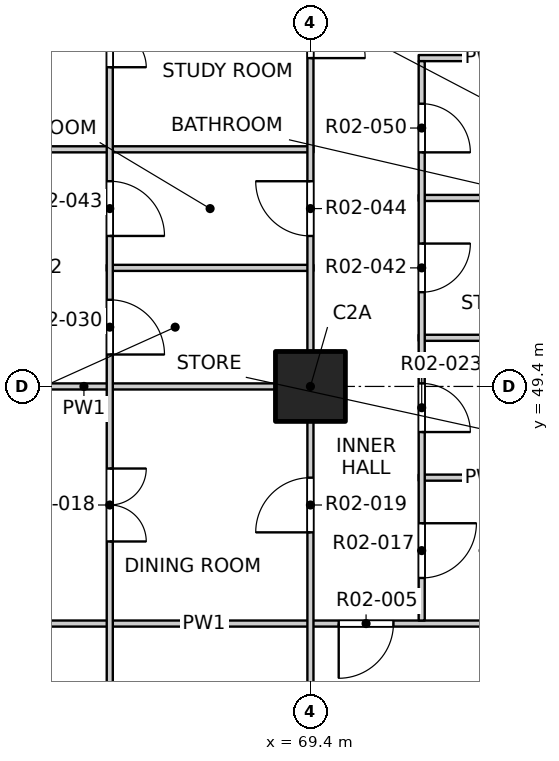
"""IFC4 building model, lengths in metres.
Left out: names, types, materials, properties, quantities, classifications, styles, units other than length and angle.
Written with IfcOpenShell. Run it as: python <this file> out.ifc"""

import sys

from ifc_helpers import new_model, si_unit, direction, frame, frame_2d, origin, origin_2d, place, context, subcontext, project, spatial, rectangle, extrude, element, fill, save


model = new_model("IFC4")
c1 = context("Model", 3, precision=1e-05, world=origin(), true_north=direction((0.0, 1.0)))
c2 = subcontext(c1, "Body", "Model", "MODEL_VIEW")
j1 = project(units=[si_unit("LENGTHUNIT", "METRE"), si_unit("PLANEANGLEUNIT", "RADIAN")], contexts=[c1])
p1 = place(None, origin())
s1 = spatial("IfcSite", under=j1, at=p1, CompositionType="ELEMENT")
p2 = place(p1, origin())
s2 = spatial("IfcBuilding", under=s1, at=p2, CompositionType="ELEMENT")
p3 = place(p2, frame((0.0, 0.0, 36.5)))
s3 = spatial("IfcBuildingStorey", under=s2, at=p3, CompositionType="ELEMENT", Elevation=36.5)
p4 = place(p3, frame((69.4, 49.4, -0.25), z_axis=(0.0, 0.0, 1.0), x_axis=(1.0, 0.0, 0.0)))
e1 = element("IfcColumn", 1, at=p4, inside=s3, PredefinedType="COLUMN", context=c2, shape_type="SweptSolid", body=[
    extrude(rectangle(XDim=1.15, YDim=1.15, at=origin_2d()), origin(), (0.0, 0.0, 1.0), 3.4),
])
p5 = place(p3, frame((61.9, 45.5, 0.0), z_axis=(0.0, 0.0, 1.0), x_axis=(1.0, 0.0, 0.0)))
e2 = element("IfcWall", 2, at=p5, inside=s3, PredefinedType="PARTITIONING", context=c2, shape_type="SweptSolid", body=[
    extrude(rectangle(XDim=11.5, YDim=0.1, at=frame_2d((5.75, 0.0))), origin(), (0.0, 0.0, 1.0), 3.15),
])
p6 = place(p5, frame((7.965, 0.0, 0.0)))
e3 = element("IfcOpeningElement", 3, at=p6, cuts=e2, PredefinedType="OPENING", context=c2, shape_type="SweptSolid", body=[
    extrude(rectangle(XDim=0.9, YDim=2.1, at=frame_2d((0.45, 1.05))), frame((0.0, 0.06, 0.0), z_axis=(0.0, -1.0, 0.0), x_axis=(1.0, 0.0, 0.0)), (0.0, 0.0, 1.0), 0.12),
])
p7 = place(p3, frame((71.18, 47.9, 0.0), z_axis=(0.0, 0.0, 1.0), x_axis=(1.0, 0.0, 0.0)))
e4 = element("IfcWall", 4, at=p7, inside=s3, PredefinedType="PARTITIONING", context=c2, shape_type="SweptSolid", body=[
    extrude(rectangle(XDim=2.22, YDim=0.1, at=frame_2d((1.11, 0.0))), origin(), (0.0, 0.0, 1.0), 3.15),
])
p8 = place(p3, frame((61.9, 49.4, 0.0), z_axis=(0.0, 0.0, 1.0), x_axis=(1.0, 0.0, 0.0)))
e5 = element("IfcWall", 5, at=p8, inside=s3, PredefinedType="PARTITIONING", context=c2, shape_type="SweptSolid", body=[
    extrude(rectangle(XDim=7.55, YDim=0.1, at=frame_2d((3.775, 0.0))), origin(), (0.0, 0.0, 1.0), 3.15),
])
p9 = place(p3, frame((71.18, 50.2, 0.0), z_axis=(0.0, 0.0, 1.0), x_axis=(1.0, 0.0, 0.0)))
e6 = element("IfcWall", 6, at=p9, inside=s3, PredefinedType="PARTITIONING", context=c2, shape_type="SweptSolid", body=[
    extrude(rectangle(XDim=2.22, YDim=0.1, at=frame_2d((1.11, 0.0))), origin(), (0.0, 0.0, 1.0), 3.15),
])
p10 = place(p3, frame((66.05, 51.35, 0.0), z_axis=(0.0, 0.0, 1.0), x_axis=(1.0, 0.0, 0.0)))
e7 = element("IfcWall", 7, at=p10, inside=s3, PredefinedType="PARTITIONING", context=c2, shape_type="SweptSolid", body=[
    extrude(rectangle(XDim=3.4, YDim=0.1, at=frame_2d((1.7, 0.0))), origin(), (0.0, 0.0, 1.0), 3.15),
])
p11 = place(p3, frame((71.18, 52.5, 0.0), z_axis=(0.0, 0.0, 1.0), x_axis=(1.0, 0.0, 0.0)))
e8 = element("IfcWall", 8, at=p11, inside=s3, PredefinedType="PARTITIONING", context=c2, shape_type="SweptSolid", body=[
    extrude(rectangle(XDim=2.22, YDim=0.1, at=frame_2d((1.11, 0.0))), origin(), (0.0, 0.0, 1.0), 3.15),
])
p12 = place(p3, frame((61.9, 53.3, 0.0), z_axis=(0.0, 0.0, 1.0), x_axis=(1.0, 0.0, 0.0)))
e9 = element("IfcWall", 9, at=p12, inside=s3, PredefinedType="PARTITIONING", context=c2, shape_type="SweptSolid", body=[
    extrude(rectangle(XDim=7.55, YDim=0.1, at=frame_2d((3.775, 0.0))), origin(), (0.0, 0.0, 1.0), 3.15),
])
p13 = place(p3, frame((71.18, 54.8, 0.0), z_axis=(0.0, 0.0, 1.0), x_axis=(1.0, 0.0, 0.0)))
e10 = element("IfcWall", 10, at=p13, inside=s3, PredefinedType="PARTITIONING", context=c2, shape_type="SweptSolid", body=[
    extrude(rectangle(XDim=2.22, YDim=0.1, at=frame_2d((1.11, 0.0))), origin(), (0.0, 0.0, 1.0), 3.15),
])
p14 = place(p3, frame((66.1, 41.9, 0.0), z_axis=(0.0, 0.0, 1.0), x_axis=(0.0, 1.0, 0.0)))
e11 = element("IfcWall", 11, at=p14, inside=s3, PredefinedType="PARTITIONING", context=c2, shape_type="SweptSolid", body=[
    extrude(rectangle(XDim=34.7, YDim=0.1, at=frame_2d((17.35, 0.0))), origin(), (0.0, 0.0, 1.0), 3.15),
])
p15 = place(p14, frame((1.05, 0.0, 0.0)))
e12 = element("IfcOpeningElement", 12, at=p15, cuts=e11, PredefinedType="OPENING", context=c2, shape_type="SweptSolid", body=[
    extrude(rectangle(XDim=1.2, YDim=2.1, at=frame_2d((0.6, 1.05))), frame((0.0, 0.06, 0.0), z_axis=(0.0, -1.0, 0.0), x_axis=(1.0, 0.0, 0.0)), (0.0, 0.0, 1.0), 0.12),
])
p16 = place(p14, frame((4.95, 0.0, 0.0)))
e13 = element("IfcOpeningElement", 13, at=p16, cuts=e11, PredefinedType="OPENING", context=c2, shape_type="SweptSolid", body=[
    extrude(rectangle(XDim=1.2, YDim=2.1, at=frame_2d((0.6, 1.05))), frame((0.0, 0.06, 0.0), z_axis=(0.0, -1.0, 0.0), x_axis=(1.0, 0.0, 0.0)), (0.0, 0.0, 1.0), 0.12),
])
p17 = place(p14, frame((8.025, 0.0, 0.0)))
e14 = element("IfcOpeningElement", 14, at=p17, cuts=e11, PredefinedType="OPENING", context=c2, shape_type="SweptSolid", body=[
    extrude(rectangle(XDim=0.9, YDim=2.1, at=frame_2d((0.45, 1.05))), frame((0.0, 0.06, 0.0), z_axis=(0.0, -1.0, 0.0), x_axis=(1.0, 0.0, 0.0)), (0.0, 0.0, 1.0), 0.12),
])
p18 = place(p14, frame((9.975, 0.0, 0.0)))
e15 = element("IfcOpeningElement", 15, at=p18, cuts=e11, PredefinedType="OPENING", context=c2, shape_type="SweptSolid", body=[
    extrude(rectangle(XDim=0.9, YDim=2.1, at=frame_2d((0.45, 1.05))), frame((0.0, 0.06, 0.0), z_axis=(0.0, -1.0, 0.0), x_axis=(1.0, 0.0, 0.0)), (0.0, 0.0, 1.0), 0.12),
])
p19 = place(p14, frame((12.75, 0.0, 0.0)))
e16 = element("IfcOpeningElement", 16, at=p19, cuts=e11, PredefinedType="OPENING", context=c2, shape_type="SweptSolid", body=[
    extrude(rectangle(XDim=1.2, YDim=2.1, at=frame_2d((0.6, 1.05))), frame((0.0, 0.06, 0.0), z_axis=(0.0, -1.0, 0.0), x_axis=(1.0, 0.0, 0.0)), (0.0, 0.0, 1.0), 0.12),
])
p20 = place(p14, frame((15.825, 0.0, 0.0)))
e17 = element("IfcOpeningElement", 17, at=p20, cuts=e11, PredefinedType="OPENING", context=c2, shape_type="SweptSolid", body=[
    extrude(rectangle(XDim=0.9, YDim=2.1, at=frame_2d((0.45, 1.05))), frame((0.0, 0.06, 0.0), z_axis=(0.0, -1.0, 0.0), x_axis=(1.0, 0.0, 0.0)), (0.0, 0.0, 1.0), 0.12),
])
p21 = place(p14, frame((17.775, 0.0, 0.0)))
e18 = element("IfcOpeningElement", 18, at=p21, cuts=e11, PredefinedType="OPENING", context=c2, shape_type="SweptSolid", body=[
    extrude(rectangle(XDim=0.9, YDim=2.1, at=frame_2d((0.45, 1.05))), frame((0.0, 0.06, 0.0), z_axis=(0.0, -1.0, 0.0), x_axis=(1.0, 0.0, 0.0)), (0.0, 0.0, 1.0), 0.12),
])
p22 = place(p14, frame((19.725, 0.0, 0.0)))
e19 = element("IfcOpeningElement", 19, at=p22, cuts=e11, PredefinedType="OPENING", context=c2, shape_type="SweptSolid", body=[
    extrude(rectangle(XDim=0.9, YDim=2.1, at=frame_2d((0.45, 1.05))), frame((0.0, 0.06, 0.0), z_axis=(0.0, -1.0, 0.0), x_axis=(1.0, 0.0, 0.0)), (0.0, 0.0, 1.0), 0.12),
])
p23 = place(p14, frame((21.675, 0.0, 0.0)))
e20 = element("IfcOpeningElement", 20, at=p23, cuts=e11, PredefinedType="OPENING", context=c2, shape_type="SweptSolid", body=[
    extrude(rectangle(XDim=0.9, YDim=2.1, at=frame_2d((0.45, 1.05))), frame((0.0, 0.06, 0.0), z_axis=(0.0, -1.0, 0.0), x_axis=(1.0, 0.0, 0.0)), (0.0, 0.0, 1.0), 0.12),
])
p24 = place(p14, frame((24.45, 0.0, 0.0)))
e21 = element("IfcOpeningElement", 21, at=p24, cuts=e11, PredefinedType="OPENING", context=c2, shape_type="SweptSolid", body=[
    extrude(rectangle(XDim=1.2, YDim=2.1, at=frame_2d((0.6, 1.05))), frame((0.0, 0.06, 0.0), z_axis=(0.0, -1.0, 0.0), x_axis=(1.0, 0.0, 0.0)), (0.0, 0.0, 1.0), 0.12),
])
p25 = place(p14, frame((27.525, 0.0, 0.0)))
e22 = element("IfcOpeningElement", 22, at=p25, cuts=e11, PredefinedType="OPENING", context=c2, shape_type="SweptSolid", body=[
    extrude(rectangle(XDim=0.9, YDim=2.1, at=frame_2d((0.45, 1.05))), frame((0.0, 0.06, 0.0), z_axis=(0.0, -1.0, 0.0), x_axis=(1.0, 0.0, 0.0)), (0.0, 0.0, 1.0), 0.12),
])
p26 = place(p14, frame((29.475, 0.0, 0.0)))
e23 = element("IfcOpeningElement", 23, at=p26, cuts=e11, PredefinedType="OPENING", context=c2, shape_type="SweptSolid", body=[
    extrude(rectangle(XDim=0.9, YDim=2.1, at=frame_2d((0.45, 1.05))), frame((0.0, 0.06, 0.0), z_axis=(0.0, -1.0, 0.0), x_axis=(1.0, 0.0, 0.0)), (0.0, 0.0, 1.0), 0.12),
])
p27 = place(p14, frame((31.425, 0.0, 0.0)))
e24 = element("IfcOpeningElement", 24, at=p27, cuts=e11, PredefinedType="OPENING", context=c2, shape_type="SweptSolid", body=[
    extrude(rectangle(XDim=0.9, YDim=2.1, at=frame_2d((0.45, 1.05))), frame((0.0, 0.06, 0.0), z_axis=(0.0, -1.0, 0.0), x_axis=(1.0, 0.0, 0.0)), (0.0, 0.0, 1.0), 0.12),
])
p28 = place(p14, frame((33.375, 0.0, 0.0)))
e25 = element("IfcOpeningElement", 25, at=p28, cuts=e11, PredefinedType="OPENING", context=c2, shape_type="SweptSolid", body=[
    extrude(rectangle(XDim=0.9, YDim=2.1, at=frame_2d((0.45, 1.05))), frame((0.0, 0.06, 0.0), z_axis=(0.0, -1.0, 0.0), x_axis=(1.0, 0.0, 0.0)), (0.0, 0.0, 1.0), 0.12),
])
p29 = place(p3, frame((69.4, 41.9, 0.0), z_axis=(0.0, 0.0, 1.0), x_axis=(0.0, 1.0, 0.0)))
e26 = element("IfcWall", 26, at=p29, inside=s3, PredefinedType="PARTITIONING", context=c2, shape_type="SweptSolid", body=[
    extrude(rectangle(XDim=46.2, YDim=0.1, at=frame_2d((23.1, 0.0))), origin(), (0.0, 0.0, 1.0), 3.15),
])
p30 = place(p29, frame((1.2, 0.0, 0.0)))
e27 = element("IfcOpeningElement", 27, at=p30, cuts=e26, PredefinedType="OPENING", context=c2, shape_type="SweptSolid", body=[
    extrude(rectangle(XDim=0.9, YDim=2.1, at=frame_2d((0.45, 1.05))), frame((0.0, 0.06, 0.0), z_axis=(0.0, -1.0, 0.0), x_axis=(1.0, 0.0, 0.0)), (0.0, 0.0, 1.0), 0.12),
])
p31 = place(p29, frame((5.1, 0.0, 0.0)))
e28 = element("IfcOpeningElement", 28, at=p31, cuts=e26, PredefinedType="OPENING", context=c2, shape_type="SweptSolid", body=[
    extrude(rectangle(XDim=0.9, YDim=2.1, at=frame_2d((0.45, 1.05))), frame((0.0, 0.06, 0.0), z_axis=(0.0, -1.0, 0.0), x_axis=(1.0, 0.0, 0.0)), (0.0, 0.0, 1.0), 0.12),
])
p32 = place(p29, frame((9.975, 0.0, 0.0)))
e29 = element("IfcOpeningElement", 29, at=p32, cuts=e26, PredefinedType="OPENING", context=c2, shape_type="SweptSolid", body=[
    extrude(rectangle(XDim=0.9, YDim=2.1, at=frame_2d((0.45, 1.05))), frame((0.0, 0.06, 0.0), z_axis=(0.0, -1.0, 0.0), x_axis=(1.0, 0.0, 0.0)), (0.0, 0.0, 1.0), 0.12),
])
p33 = place(p29, frame((12.9, 0.0, 0.0)))
e30 = element("IfcOpeningElement", 30, at=p33, cuts=e26, PredefinedType="OPENING", context=c2, shape_type="SweptSolid", body=[
    extrude(rectangle(XDim=0.9, YDim=2.1, at=frame_2d((0.45, 1.05))), frame((0.0, 0.06, 0.0), z_axis=(0.0, -1.0, 0.0), x_axis=(1.0, 0.0, 0.0)), (0.0, 0.0, 1.0), 0.12),
])
p34 = place(p29, frame((17.775, 0.0, 0.0)))
e31 = element("IfcOpeningElement", 31, at=p34, cuts=e26, PredefinedType="OPENING", context=c2, shape_type="SweptSolid", body=[
    extrude(rectangle(XDim=0.9, YDim=2.1, at=frame_2d((0.45, 1.05))), frame((0.0, 0.06, 0.0), z_axis=(0.0, -1.0, 0.0), x_axis=(1.0, 0.0, 0.0)), (0.0, 0.0, 1.0), 0.12),
])
p35 = place(p29, frame((21.5, 0.0, 0.0)))
e32 = element("IfcOpeningElement", 32, at=p35, cuts=e26, PredefinedType="OPENING", context=c2, shape_type="SweptSolid", body=[
    extrude(rectangle(XDim=0.9, YDim=2.1, at=frame_2d((0.45, 1.05))), frame((0.0, 0.06, 0.0), z_axis=(0.0, -1.0, 0.0), x_axis=(1.0, 0.0, 0.0)), (0.0, 0.0, 1.0), 0.12),
])
p36 = place(p29, frame((24.6, 0.0, 0.0)))
e33 = element("IfcOpeningElement", 33, at=p36, cuts=e26, PredefinedType="OPENING", context=c2, shape_type="SweptSolid", body=[
    extrude(rectangle(XDim=0.9, YDim=2.1, at=frame_2d((0.45, 1.05))), frame((0.0, 0.06, 0.0), z_axis=(0.0, -1.0, 0.0), x_axis=(1.0, 0.0, 0.0)), (0.0, 0.0, 1.0), 0.12),
])
p37 = place(p29, frame((29.3, 0.0, 0.0)))
e34 = element("IfcOpeningElement", 34, at=p37, cuts=e26, PredefinedType="OPENING", context=c2, shape_type="SweptSolid", body=[
    extrude(rectangle(XDim=0.9, YDim=2.1, at=frame_2d((0.45, 1.05))), frame((0.0, 0.06, 0.0), z_axis=(0.0, -1.0, 0.0), x_axis=(1.0, 0.0, 0.0)), (0.0, 0.0, 1.0), 0.12),
])
p38 = place(p29, frame((33.375, 0.0, 0.0)))
e35 = element("IfcOpeningElement", 35, at=p38, cuts=e26, PredefinedType="OPENING", context=c2, shape_type="SweptSolid", body=[
    extrude(rectangle(XDim=0.9, YDim=2.1, at=frame_2d((0.45, 1.05))), frame((0.0, 0.06, 0.0), z_axis=(0.0, -1.0, 0.0), x_axis=(1.0, 0.0, 0.0)), (0.0, 0.0, 1.0), 0.12),
])
p39 = place(p29, frame((37.1, 0.0, 0.0)))
e36 = element("IfcOpeningElement", 36, at=p39, cuts=e26, PredefinedType="OPENING", context=c2, shape_type="SweptSolid", body=[
    extrude(rectangle(XDim=0.9, YDim=2.1, at=frame_2d((0.45, 1.05))), frame((0.0, 0.06, 0.0), z_axis=(0.0, -1.0, 0.0), x_axis=(1.0, 0.0, 0.0)), (0.0, 0.0, 1.0), 0.12),
])
p40 = place(p29, frame((41.175, 0.0, 0.0)))
e37 = element("IfcOpeningElement", 37, at=p40, cuts=e26, PredefinedType="OPENING", context=c2, shape_type="SweptSolid", body=[
    extrude(rectangle(XDim=0.9, YDim=2.1, at=frame_2d((0.45, 1.05))), frame((0.0, 0.06, 0.0), z_axis=(0.0, -1.0, 0.0), x_axis=(1.0, 0.0, 0.0)), (0.0, 0.0, 1.0), 0.12),
])
p41 = place(p29, frame((44.1, 0.0, 0.0)))
e38 = element("IfcOpeningElement", 38, at=p41, cuts=e26, PredefinedType="OPENING", context=c2, shape_type="SweptSolid", body=[
    extrude(rectangle(XDim=0.9, YDim=2.1, at=frame_2d((0.45, 1.05))), frame((0.0, 0.06, 0.0), z_axis=(0.0, -1.0, 0.0), x_axis=(1.0, 0.0, 0.0)), (0.0, 0.0, 1.0), 0.12),
])
p42 = place(p3, frame((71.23, 45.55, 0.0), z_axis=(0.0, 0.0, 1.0), x_axis=(0.0, 1.0, 0.0)))
e39 = element("IfcWall", 39, at=p42, inside=s3, PredefinedType="PARTITIONING", context=c2, shape_type="SweptSolid", body=[
    extrude(rectangle(XDim=9.2, YDim=0.1, at=frame_2d((4.6, 0.0))), origin(), (0.0, 0.0, 1.0), 3.15),
])
p43 = place(p42, frame((0.7, 0.0, 0.0)))
e40 = element("IfcOpeningElement", 40, at=p43, cuts=e39, PredefinedType="OPENING", context=c2, shape_type="SweptSolid", body=[
    extrude(rectangle(XDim=0.9, YDim=2.1, at=frame_2d((0.45, 1.05))), frame((0.0, 0.06, 0.0), z_axis=(0.0, -1.0, 0.0), x_axis=(1.0, 0.0, 0.0)), (0.0, 0.0, 1.0), 0.12),
])
p44 = place(p42, frame((3.1, 0.0, 0.0)))
e41 = element("IfcOpeningElement", 41, at=p44, cuts=e39, PredefinedType="OPENING", context=c2, shape_type="SweptSolid", body=[
    extrude(rectangle(XDim=0.8, YDim=2.1, at=frame_2d((0.4, 1.05))), frame((0.0, 0.06, 0.0), z_axis=(0.0, -1.0, 0.0), x_axis=(1.0, 0.0, 0.0)), (0.0, 0.0, 1.0), 0.12),
])
p45 = place(p42, frame((5.4, 0.0, 0.0)))
e42 = element("IfcOpeningElement", 42, at=p45, cuts=e39, PredefinedType="OPENING", context=c2, shape_type="SweptSolid", body=[
    extrude(rectangle(XDim=0.8, YDim=2.1, at=frame_2d((0.4, 1.05))), frame((0.0, 0.06, 0.0), z_axis=(0.0, -1.0, 0.0), x_axis=(1.0, 0.0, 0.0)), (0.0, 0.0, 1.0), 0.12),
])
p46 = place(p42, frame((7.7, 0.0, 0.0)))
e43 = element("IfcOpeningElement", 43, at=p46, cuts=e39, PredefinedType="OPENING", context=c2, shape_type="SweptSolid", body=[
    extrude(rectangle(XDim=0.8, YDim=2.1, at=frame_2d((0.4, 1.05))), frame((0.0, 0.06, 0.0), z_axis=(0.0, -1.0, 0.0), x_axis=(1.0, 0.0, 0.0)), (0.0, 0.0, 1.0), 0.12),
])
p47 = place(p6, origin())
e44 = element("IfcDoor", 44, at=p47, inside=s3, OperationType="SINGLE_SWING_RIGHT", PredefinedType="DOOR", context=c2, shape_type="SweptSolid", body=[
    extrude(rectangle(XDim=0.9, YDim=2.1, at=frame_2d((0.45, 1.05))), frame((0.0, 0.025, 0.0), z_axis=(0.0, -1.0, 0.0), x_axis=(1.0, 0.0, 0.0)), (0.0, 0.0, 1.0), 0.05),
])
fill(e3, e44)
p48 = place(p43, origin())
e45 = element("IfcDoor", 45, at=p48, inside=s3, OperationType="SINGLE_SWING_LEFT", PredefinedType="DOOR", context=c2, shape_type="SweptSolid", body=[
    extrude(rectangle(XDim=0.9, YDim=2.1, at=frame_2d((0.45, 1.05))), frame((0.0, 0.025, 0.0), z_axis=(0.0, -1.0, 0.0), x_axis=(1.0, 0.0, 0.0)), (0.0, 0.0, 1.0), 0.05),
])
fill(e40, e45)
p49 = place(p16, origin())
e46 = element("IfcDoor", 46, at=p49, inside=s3, OperationType="DOUBLE_DOOR_SINGLE_SWING", PredefinedType="DOOR", context=c2, shape_type="SweptSolid", body=[
    extrude(rectangle(XDim=1.2, YDim=2.1, at=frame_2d((0.6, 1.05))), frame((0.0, 0.025, 0.0), z_axis=(0.0, -1.0, 0.0), x_axis=(1.0, 0.0, 0.0)), (0.0, 0.0, 1.0), 0.05),
])
fill(e13, e46)
p50 = place(p31, origin())
e47 = element("IfcDoor", 47, at=p50, inside=s3, OperationType="SINGLE_SWING_LEFT", PredefinedType="DOOR", context=c2, shape_type="SweptSolid", body=[
    extrude(rectangle(XDim=0.9, YDim=2.1, at=frame_2d((0.45, 1.05))), frame((0.0, 0.025, 0.0), z_axis=(0.0, -1.0, 0.0), x_axis=(1.0, 0.0, 0.0)), (0.0, 0.0, 1.0), 0.05),
])
fill(e28, e47)
p51 = place(p44, origin())
e48 = element("IfcDoor", 48, at=p51, inside=s3, OperationType="SINGLE_SWING_RIGHT", PredefinedType="DOOR", context=c2, shape_type="SweptSolid", body=[
    extrude(rectangle(XDim=0.8, YDim=2.1, at=frame_2d((0.4, 1.05))), frame((0.0, 0.025, 0.0), z_axis=(0.0, -1.0, 0.0), x_axis=(1.0, 0.0, 0.0)), (0.0, 0.0, 1.0), 0.05),
])
fill(e41, e48)
p52 = place(p17, origin())
e49 = element("IfcDoor", 49, at=p52, inside=s3, OperationType="SINGLE_SWING_RIGHT", PredefinedType="DOOR", context=c2, shape_type="SweptSolid", body=[
    extrude(rectangle(XDim=0.9, YDim=2.1, at=frame_2d((0.45, 1.05))), frame((0.0, 0.025, 0.0), z_axis=(0.0, -1.0, 0.0), x_axis=(1.0, 0.0, 0.0)), (0.0, 0.0, 1.0), 0.05),
])
fill(e14, e49)
p53 = place(p45, origin())
e50 = element("IfcDoor", 50, at=p53, inside=s3, OperationType="SINGLE_SWING_LEFT", PredefinedType="DOOR", context=c2, shape_type="SweptSolid", body=[
    extrude(rectangle(XDim=0.8, YDim=2.1, at=frame_2d((0.4, 1.05))), frame((0.0, 0.025, 0.0), z_axis=(0.0, -1.0, 0.0), x_axis=(1.0, 0.0, 0.0)), (0.0, 0.0, 1.0), 0.05),
])
fill(e42, e50)
p54 = place(p18, origin())
e51 = element("IfcDoor", 51, at=p54, inside=s3, OperationType="SINGLE_SWING_RIGHT", PredefinedType="DOOR", context=c2, shape_type="SweptSolid", body=[
    extrude(rectangle(XDim=0.9, YDim=2.1, at=frame_2d((0.45, 1.05))), frame((0.0, 0.025, 0.0), z_axis=(0.0, -1.0, 0.0), x_axis=(1.0, 0.0, 0.0)), (0.0, 0.0, 1.0), 0.05),
])
fill(e15, e51)
p55 = place(p32, origin())
e52 = element("IfcDoor", 52, at=p55, inside=s3, OperationType="SINGLE_SWING_RIGHT", PredefinedType="DOOR", context=c2, shape_type="SweptSolid", body=[
    extrude(rectangle(XDim=0.9, YDim=2.1, at=frame_2d((0.45, 1.05))), frame((0.0, 0.025, 0.0), z_axis=(0.0, -1.0, 0.0), x_axis=(1.0, 0.0, 0.0)), (0.0, 0.0, 1.0), 0.05),
])
fill(e29, e52)
p56 = place(p46, origin())
e53 = element("IfcDoor", 53, at=p56, inside=s3, OperationType="SINGLE_SWING_RIGHT", PredefinedType="DOOR", context=c2, shape_type="SweptSolid", body=[
    extrude(rectangle(XDim=0.8, YDim=2.1, at=frame_2d((0.4, 1.05))), frame((0.0, 0.025, 0.0), z_axis=(0.0, -1.0, 0.0), x_axis=(1.0, 0.0, 0.0)), (0.0, 0.0, 1.0), 0.05),
])
fill(e43, e53)
p57 = place(p19, origin())
e54 = element("IfcDoor", 54, at=p57, inside=s3, OperationType="DOUBLE_DOOR_SINGLE_SWING", PredefinedType="DOOR", context=c2, shape_type="SweptSolid", body=[
    extrude(rectangle(XDim=1.2, YDim=2.1, at=frame_2d((0.6, 1.05))), frame((0.0, 0.025, 0.0), z_axis=(0.0, -1.0, 0.0), x_axis=(1.0, 0.0, 0.0)), (0.0, 0.0, 1.0), 0.05),
])
fill(e16, e54)
p58 = place(p33, origin())
e55 = element("IfcDoor", 55, at=p58, inside=s3, OperationType="SINGLE_SWING_RIGHT", PredefinedType="DOOR", context=c2, shape_type="SweptSolid", body=[
    extrude(rectangle(XDim=0.9, YDim=2.1, at=frame_2d((0.45, 1.05))), frame((0.0, 0.025, 0.0), z_axis=(0.0, -1.0, 0.0), x_axis=(1.0, 0.0, 0.0)), (0.0, 0.0, 1.0), 0.05),
])
fill(e30, e55)
save(model, sys.argv[1])
